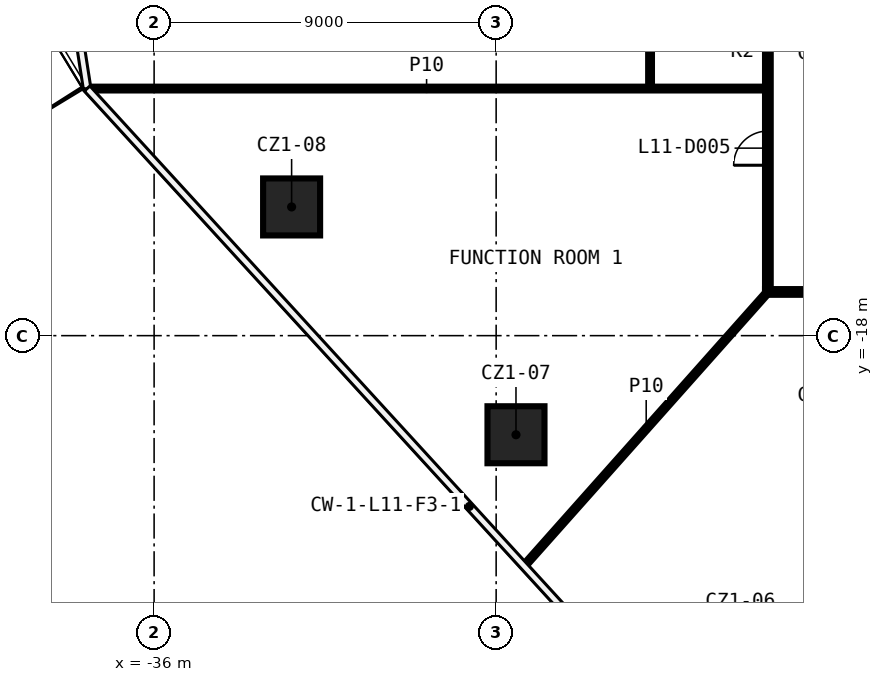
"""IFC4 building model, lengths in metres.
Left out: names, types, materials, properties, quantities, classifications, styles, units other than length and angle.
Written with IfcOpenShell. Run it as: python <this file> out.ifc"""

import sys

from ifc_helpers import new_model, si_unit, direction, frame, frame_2d, origin, origin_2d, place, context, subcontext, project, spatial, rectangle, extrude, element, fill, save


model = new_model("IFC4")
c1 = context("Model", 3, precision=1e-05, world=origin(), true_north=direction((0.0, 1.0)))
c2 = subcontext(c1, "Body", "Model", "MODEL_VIEW")
j1 = project(units=[si_unit("LENGTHUNIT", "METRE"), si_unit("PLANEANGLEUNIT", "RADIAN")], contexts=[c1])
p1 = place(None, origin())
s1 = spatial("IfcSite", under=j1, at=p1, CompositionType="ELEMENT")
p2 = place(p1, origin())
s2 = spatial("IfcBuilding", under=s1, at=p2, CompositionType="ELEMENT")
p3 = place(p2, frame((0.0, 0.0, 62.5)))
s3 = spatial("IfcBuildingStorey", under=s2, at=p3, CompositionType="ELEMENT", Elevation=62.5)
for number, where, z_axis, x_axis in (
    (1, (-26.478, -20.608, 0.0), (0.0, 0.0, 1.0), (1.0, 0.0, 0.0)),
    (2, (-32.382, -14.613, 0.0), (0.0, 0.0, 1.0), (1.0, 0.0, 0.0)),
):
    element("IfcColumn", number, at=place(p3, frame(where, z_axis=z_axis, x_axis=x_axis)), inside=s3, PredefinedType="COLUMN", context=c2, shape_type="SweptSolid", body=[
        extrude(rectangle(XDim=1.5, YDim=1.5, at=origin_2d()), origin(), (0.0, 0.0, 1.0), 3.3),
    ])
p4 = place(p3, frame((19.925, -16.85, 0.0), z_axis=(0.0, 0.0, 1.0), x_axis=(-1.0, 0.0, 0.0)))
e3 = element("IfcWall", 3, at=p4, inside=s3, PredefinedType="PARTITIONING", context=c2, shape_type="SweptSolid", body=[
    extrude(rectangle(XDim=39.85, YDim=0.15, at=frame_2d((19.925, 0.0))), origin(), (0.0, 0.0, 1.0), 3.3),
])
p5 = place(p4, frame((35.041, 0.0, 0.0)))
e4 = element("IfcOpeningElement", 4, at=p5, cuts=e3, PredefinedType="OPENING", context=c2, shape_type="SweptSolid", body=[
    extrude(rectangle(XDim=0.9, YDim=2.1, at=frame_2d((0.45, 1.05))), frame((0.0, 0.085, 0.0), z_axis=(0.0, -1.0, 0.0), x_axis=(1.0, 0.0, 0.0)), (0.0, 0.0, 1.0), 0.17),
])
p6 = place(p4, frame((31.0, 0.0, 0.0)))
e5 = element("IfcOpeningElement", 5, at=p6, cuts=e3, PredefinedType="OPENING", context=c2, shape_type="SweptSolid", body=[
    extrude(rectangle(XDim=1.0, YDim=2.1, at=frame_2d((0.5, 1.05))), frame((0.0, 0.085, 0.0), z_axis=(0.0, -1.0, 0.0), x_axis=(1.0, 0.0, 0.0)), (0.0, 0.0, 1.0), 0.17),
])
p7 = place(p4, frame((25.711, 0.0, 0.0)))
e6 = element("IfcOpeningElement", 6, at=p7, cuts=e3, PredefinedType="OPENING", context=c2, shape_type="SweptSolid", body=[
    extrude(rectangle(XDim=0.9, YDim=2.1, at=frame_2d((0.45, 1.05))), frame((0.0, 0.085, 0.0), z_axis=(0.0, -1.0, 0.0), x_axis=(1.0, 0.0, 0.0)), (0.0, 0.0, 1.0), 0.17),
])
p8 = place(p4, frame((22.072, 0.0, 0.0)))
e7 = element("IfcOpeningElement", 7, at=p8, cuts=e3, PredefinedType="OPENING", context=c2, shape_type="SweptSolid", body=[
    extrude(rectangle(XDim=0.9, YDim=2.1, at=frame_2d((0.45, 1.05))), frame((0.0, 0.085, 0.0), z_axis=(0.0, -1.0, 0.0), x_axis=(1.0, 0.0, 0.0)), (0.0, 0.0, 1.0), 0.17),
])
p9 = place(p4, frame((17.034, 0.0, 0.0)))
e8 = element("IfcOpeningElement", 8, at=p9, cuts=e3, PredefinedType="OPENING", context=c2, shape_type="SweptSolid", body=[
    extrude(rectangle(XDim=0.9, YDim=2.1, at=frame_2d((0.45, 1.05))), frame((0.0, 0.085, 0.0), z_axis=(0.0, -1.0, 0.0), x_axis=(1.0, 0.0, 0.0)), (0.0, 0.0, 1.0), 0.17),
])
p10 = place(p4, frame((13.675, 0.0, 0.0)))
e9 = element("IfcOpeningElement", 9, at=p10, cuts=e3, PredefinedType="OPENING", context=c2, shape_type="SweptSolid", body=[
    extrude(rectangle(XDim=0.9, YDim=2.1, at=frame_2d((0.45, 1.05))), frame((0.0, 0.085, 0.0), z_axis=(0.0, -1.0, 0.0), x_axis=(1.0, 0.0, 0.0)), (0.0, 0.0, 1.0), 0.17),
])
p11 = place(p4, frame((4.031, 0.0, 0.0)))
e10 = element("IfcOpeningElement", 10, at=p11, cuts=e3, PredefinedType="OPENING", context=c2, shape_type="SweptSolid", body=[
    extrude(rectangle(XDim=1.0, YDim=2.1, at=frame_2d((0.5, 1.05))), frame((0.0, 0.085, 0.0), z_axis=(0.0, -1.0, 0.0), x_axis=(1.0, 0.0, 0.0)), (0.0, 0.0, 1.0), 0.17),
])
p12 = place(p3, frame((-37.736, -11.498, 0.0), z_axis=(0.0, 0.0, 1.0), x_axis=(1.0, 0.0, 0.0)))
e11 = element("IfcWall", 11, at=p12, inside=s3, PredefinedType="PARTITIONING", context=c2, shape_type="SweptSolid", body=[
    extrude(rectangle(XDim=17.811, YDim=0.1, at=frame_2d((8.905, 0.0))), origin(), (0.0, 0.0, 1.0), 3.3),
])
p13 = place(p3, frame((-26.253, -24.05, 0.0), z_axis=(0.0, 0.0, 1.0), x_axis=(0.66458555916, 0.747212175059, 0.0)))
e12 = element("IfcWall", 12, at=p13, inside=s3, PredefinedType="PARTITIONING", context=c2, shape_type="SweptSolid", body=[
    extrude(rectangle(XDim=9.635, YDim=0.1, at=frame_2d((4.818, 0.0))), origin(), (0.0, 0.0, 1.0), 3.3),
])
p14 = place(p3, frame((-19.85, -16.775, 0.0), z_axis=(0.0, 0.0, 1.0), x_axis=(0.0, 1.0, 0.0)))
e13 = element("IfcWall", 13, at=p14, inside=s3, PredefinedType="PARTITIONING", context=c2, shape_type="SweptSolid", body=[
    extrude(rectangle(XDim=33.55, YDim=0.15, at=frame_2d((16.775, 0.0))), origin(), (0.0, 0.0, 1.0), 3.3),
])
p15 = place(p14, frame((12.083, 0.0, 0.0)))
e14 = element("IfcOpeningElement", 14, at=p15, cuts=e13, PredefinedType="OPENING", context=c2, shape_type="SweptSolid", body=[
    extrude(rectangle(XDim=1.0, YDim=2.1, at=frame_2d((0.5, 1.05))), frame((0.0, 0.085, 0.0), z_axis=(0.0, -1.0, 0.0), x_axis=(1.0, 0.0, 0.0)), (0.0, 0.0, 1.0), 0.17),
])
p16 = place(p14, frame((10.128, 0.0, 0.0)))
e15 = element("IfcOpeningElement", 15, at=p16, cuts=e13, PredefinedType="OPENING", context=c2, shape_type="SweptSolid", body=[
    extrude(rectangle(XDim=1.0, YDim=2.1, at=frame_2d((0.5, 1.05))), frame((0.0, 0.085, 0.0), z_axis=(0.0, -1.0, 0.0), x_axis=(1.0, 0.0, 0.0)), (0.0, 0.0, 1.0), 0.17),
])
p17 = place(p14, frame((3.259, 0.0, 0.0)))
e16 = element("IfcOpeningElement", 16, at=p17, cuts=e13, PredefinedType="OPENING", context=c2, shape_type="SweptSolid", body=[
    extrude(rectangle(XDim=0.9, YDim=2.1, at=frame_2d((0.45, 1.05))), frame((0.0, 0.085, 0.0), z_axis=(0.0, -1.0, 0.0), x_axis=(1.0, 0.0, 0.0)), (0.0, 0.0, 1.0), 0.17),
])
p18 = place(p14, frame((30.799, 0.0, 0.0)))
e17 = element("IfcOpeningElement", 17, at=p18, cuts=e13, PredefinedType="OPENING", context=c2, shape_type="SweptSolid", body=[
    extrude(rectangle(XDim=1.0, YDim=2.1, at=frame_2d((0.5, 1.05))), frame((0.0, 0.085, 0.0), z_axis=(0.0, -1.0, 0.0), x_axis=(1.0, 0.0, 0.0)), (0.0, 0.0, 1.0), 0.17),
])
p19 = place(p14, frame((22.638, 0.0, 0.0)))
e18 = element("IfcOpeningElement", 18, at=p19, cuts=e13, PredefinedType="OPENING", context=c2, shape_type="SweptSolid", body=[
    extrude(rectangle(XDim=1.0, YDim=2.1, at=frame_2d((0.5, 1.05))), frame((0.0, 0.085, 0.0), z_axis=(0.0, -1.0, 0.0), x_axis=(1.0, 0.0, 0.0)), (0.0, 0.0, 1.0), 0.17),
])
p20 = place(p14, frame((18.681, 0.0, 0.0)))
e19 = element("IfcOpeningElement", 19, at=p20, cuts=e13, PredefinedType="OPENING", context=c2, shape_type="SweptSolid", body=[
    extrude(rectangle(XDim=0.9, YDim=2.1, at=frame_2d((0.45, 1.05))), frame((0.0, 0.085, 0.0), z_axis=(0.0, -1.0, 0.0), x_axis=(1.0, 0.0, 0.0)), (0.0, 0.0, 1.0), 0.17),
])
p21 = place(p3, frame((-22.95, -11.448, 0.0), z_axis=(0.0, 0.0, 1.0), x_axis=(0.0, 1.0, 0.0)))
e20 = element("IfcWall", 20, at=p21, inside=s3, PredefinedType="PARTITIONING", context=c2, shape_type="SweptSolid", body=[
    extrude(rectangle(XDim=2.3, YDim=0.1, at=frame_2d((1.15, 0.0))), origin(), (0.0, 0.0, 1.0), 3.3),
])
p22 = place(p17, origin())
e21 = element("IfcDoor", 21, at=p22, inside=s3, OperationType="SINGLE_SWING_RIGHT", PredefinedType="DOOR", context=c2, shape_type="SweptSolid", body=[
    extrude(rectangle(XDim=0.9, YDim=2.1, at=frame_2d((0.45, 1.05))), frame((0.0, 0.025, 0.0), z_axis=(0.0, -1.0, 0.0), x_axis=(1.0, 0.0, 0.0)), (0.0, 0.0, 1.0), 0.05),
])
fill(e16, e21)
save(model, sys.argv[1])
